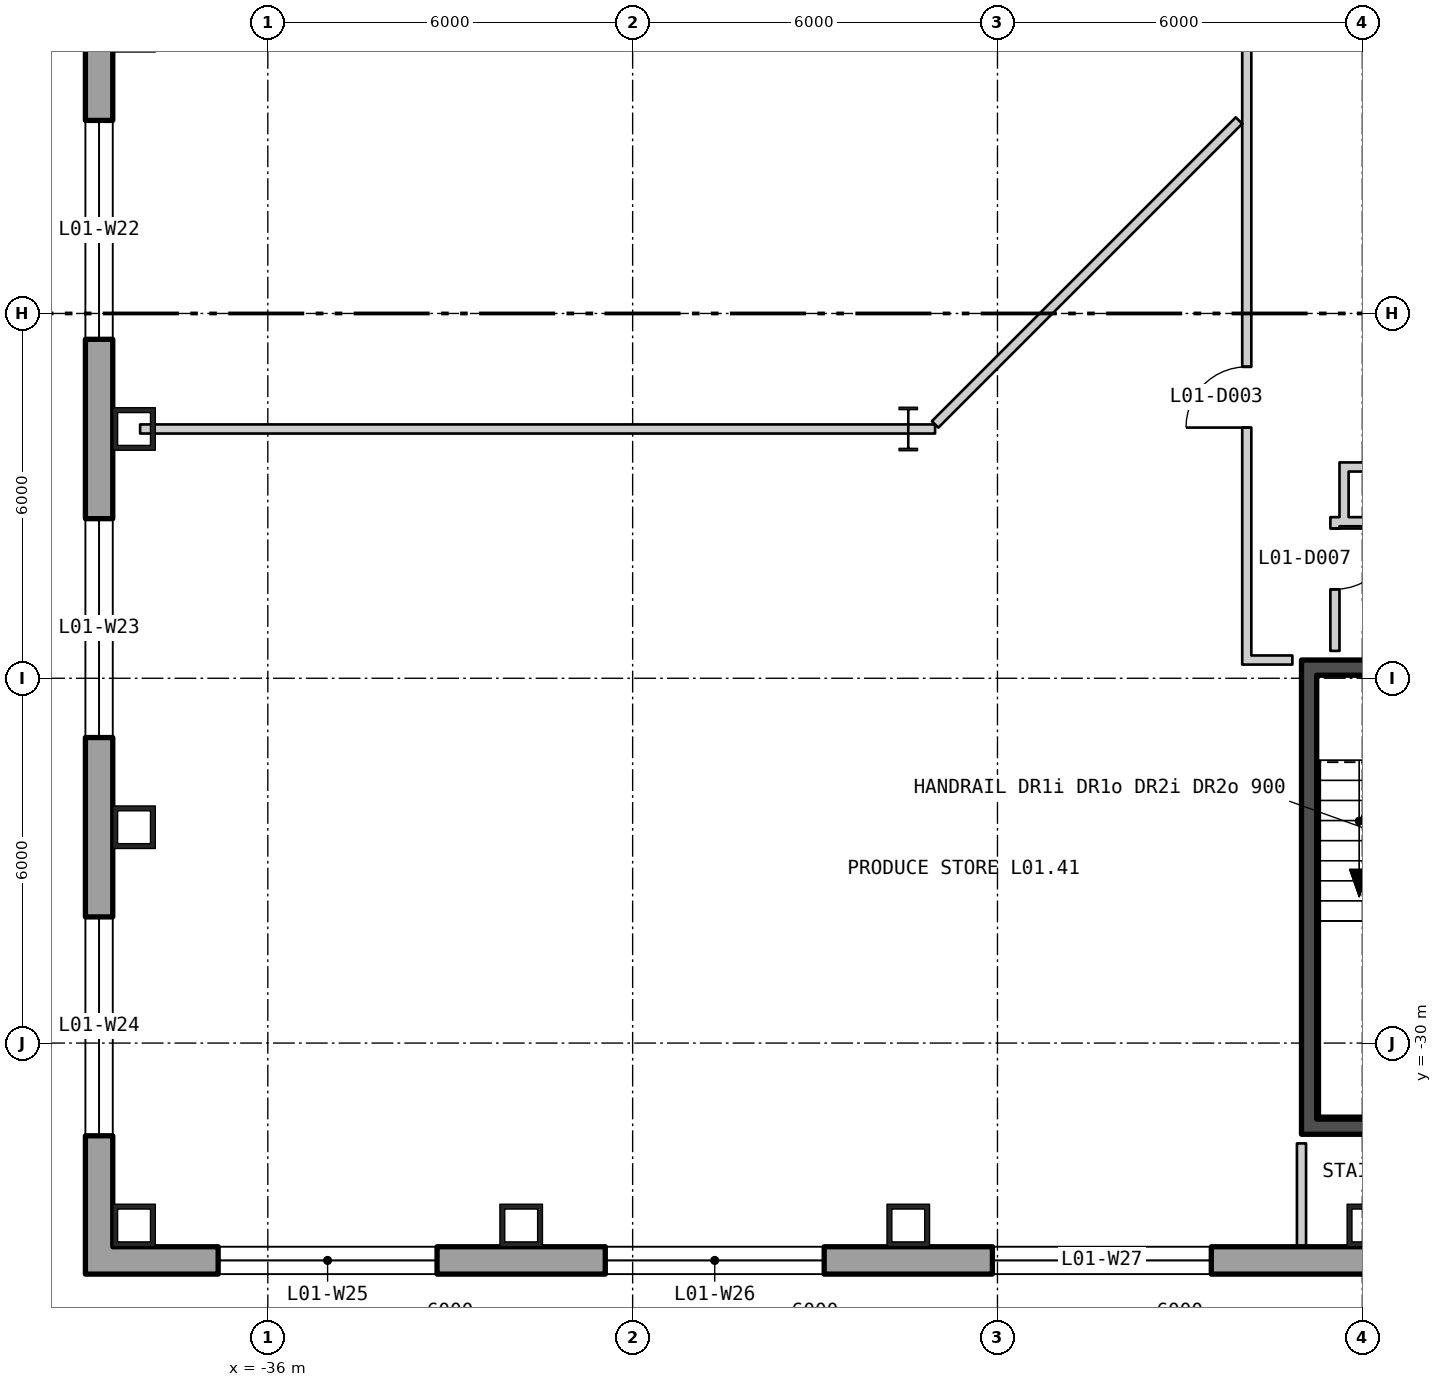
"""IFC4 building model, lengths in metres.
Left out: names, types, materials, properties, quantities, classifications, styles, units other than length and angle.
Written with IfcOpenShell. Run it as: python <this file> out.ifc"""

import sys

from ifc_helpers import new_model, si_unit, direction, frame, frame_2d, origin, origin_2d, place, context, subcontext, project, spatial, polyline, rectangle, hollow_rectangle, i_section, outline, extrude, element, fill, save


model = new_model("IFC4")
c1 = context("Model", 3, precision=1e-05, world=origin(), true_north=direction((0.0, 1.0)))
c2 = subcontext(c1, "Body", "Model", "MODEL_VIEW")
j1 = project(units=[si_unit("LENGTHUNIT", "METRE"), si_unit("PLANEANGLEUNIT", "RADIAN")], contexts=[c1])
p1 = place(None, origin())
s1 = spatial("IfcSite", under=j1, at=p1, CompositionType="ELEMENT")
p2 = place(p1, origin())
s2 = spatial("IfcBuilding", under=s1, at=p2, CompositionType="ELEMENT")
p3 = place(p2, frame((0.0, 0.0, 8.4)))
s3 = spatial("IfcBuildingStorey", under=s2, at=p3, CompositionType="ELEMENT", Elevation=8.4)
for number, where, z_axis, x_axis in (
    (1, (-38.2, -19.9, 0.0), (0.0, 0.0, 1.0), (0.0, -1.0, 0.0)),
    (2, (-38.2, -26.45, 0.0), (0.0, 0.0, 1.0), (0.0, -1.0, 0.0)),
    (3, (-38.2, -33.0, 0.0), (0.0, 0.0, 1.0), (1.0, 0.0, 0.0)),
    (4, (-31.833, -33.0, 0.0), (0.0, 0.0, 1.0), (1.0, 0.0, 0.0)),
    (5, (-25.467, -33.0, 0.0), (0.0, 0.0, 1.0), (1.0, 0.0, 0.0)),
    (6, (-17.9, -33.0, 0.0), (0.0, 0.0, 1.0), (1.0, 0.0, 0.0)),
):
    element("IfcColumn", number, at=place(p3, frame(where, z_axis=z_axis, x_axis=x_axis)), inside=s3, PredefinedType="COLUMN", context=c2, shape_type="SweptSolid", body=[
        extrude(hollow_rectangle(XDim=0.7, YDim=0.7, WallThickness=0.08, at=origin_2d()), origin(), (0.0, 0.0, 1.0), 5.1),
    ])
p4 = place(p3, frame((-25.467, -19.9, 0.0), z_axis=(0.0, 0.0, 1.0), x_axis=(1.0, 0.0, 0.0)))
e7 = element("IfcColumn", 7, at=p4, inside=s3, PredefinedType="COLUMN", context=c2, shape_type="SweptSolid", body=[
    extrude(i_section(OverallWidth=0.304, OverallDepth=0.716, WebThickness=0.021, FlangeThickness=0.04, at=origin_2d()), origin(), (0.0, 0.0, 1.0), 5.1),
])
p5 = place(p3, frame((-38.775, 19.975, -0.4), z_axis=(0.0, 0.0, 1.0), x_axis=(0.0, -1.0, 0.0)))
e8 = element("IfcWall", 8, at=p5, inside=s3, PredefinedType="SOLIDWALL", context=c2, shape_type="SweptSolid", body=[
    extrude(outline(polyline([(-0.225, -0.225), (53.775, -0.225), (53.325, 0.225), (0.225, 0.225), (-0.225, -0.225)])), origin(), (0.0, 0.0, 1.0), 5.1),
])
p6 = place(p5, frame((2.05, 0.0, 1.3)))
e9 = element("IfcOpeningElement", 9, at=p6, cuts=e8, PredefinedType="OPENING", context=c2, shape_type="SweptSolid", body=[
    extrude(rectangle(XDim=3.6, YDim=3.2, at=frame_2d((1.8, 1.6))), frame((0.0, 0.235, 0.0), z_axis=(0.0, -1.0, 0.0), x_axis=(1.0, 0.0, 0.0)), (0.0, 0.0, 1.0), 0.47),
])
p7 = place(p5, frame((8.6, 0.0, 1.3)))
e10 = element("IfcOpeningElement", 10, at=p7, cuts=e8, PredefinedType="OPENING", context=c2, shape_type="SweptSolid", body=[
    extrude(rectangle(XDim=3.6, YDim=3.2, at=frame_2d((1.8, 1.6))), frame((0.0, 0.235, 0.0), z_axis=(0.0, -1.0, 0.0), x_axis=(1.0, 0.0, 0.0)), (0.0, 0.0, 1.0), 0.47),
])
p8 = place(p5, frame((15.15, 0.0, 1.3)))
e11 = element("IfcOpeningElement", 11, at=p8, cuts=e8, PredefinedType="OPENING", context=c2, shape_type="SweptSolid", body=[
    extrude(rectangle(XDim=3.6, YDim=3.2, at=frame_2d((1.8, 1.6))), frame((0.0, 0.235, 0.0), z_axis=(0.0, -1.0, 0.0), x_axis=(1.0, 0.0, 0.0)), (0.0, 0.0, 1.0), 0.47),
])
p9 = place(p5, frame((21.7, 0.0, 1.3)))
e12 = element("IfcOpeningElement", 12, at=p9, cuts=e8, PredefinedType="OPENING", context=c2, shape_type="SweptSolid", body=[
    extrude(rectangle(XDim=3.6, YDim=3.2, at=frame_2d((1.8, 1.6))), frame((0.0, 0.235, 0.0), z_axis=(0.0, -1.0, 0.0), x_axis=(1.0, 0.0, 0.0)), (0.0, 0.0, 1.0), 0.47),
])
p10 = place(p5, frame((28.25, 0.0, 1.3)))
e13 = element("IfcOpeningElement", 13, at=p10, cuts=e8, PredefinedType="OPENING", context=c2, shape_type="SweptSolid", body=[
    extrude(rectangle(XDim=3.6, YDim=3.2, at=frame_2d((1.8, 1.6))), frame((0.0, 0.235, 0.0), z_axis=(0.0, -1.0, 0.0), x_axis=(1.0, 0.0, 0.0)), (0.0, 0.0, 1.0), 0.47),
])
p11 = place(p5, frame((34.8, 0.0, 1.3)))
e14 = element("IfcOpeningElement", 14, at=p11, cuts=e8, PredefinedType="OPENING", context=c2, shape_type="SweptSolid", body=[
    extrude(rectangle(XDim=3.6, YDim=3.2, at=frame_2d((1.8, 1.6))), frame((0.0, 0.235, 0.0), z_axis=(0.0, -1.0, 0.0), x_axis=(1.0, 0.0, 0.0)), (0.0, 0.0, 1.0), 0.47),
])
p12 = place(p5, frame((41.35, 0.0, 1.3)))
e15 = element("IfcOpeningElement", 15, at=p12, cuts=e8, PredefinedType="OPENING", context=c2, shape_type="SweptSolid", body=[
    extrude(rectangle(XDim=3.6, YDim=3.2, at=frame_2d((1.8, 1.6))), frame((0.0, 0.235, 0.0), z_axis=(0.0, -1.0, 0.0), x_axis=(1.0, 0.0, 0.0)), (0.0, 0.0, 1.0), 0.47),
])
p13 = place(p5, frame((47.9, 0.0, 1.3)))
e16 = element("IfcOpeningElement", 16, at=p13, cuts=e8, PredefinedType="OPENING", context=c2, shape_type="SweptSolid", body=[
    extrude(rectangle(XDim=3.6, YDim=3.2, at=frame_2d((1.8, 1.6))), frame((0.0, 0.235, 0.0), z_axis=(0.0, -1.0, 0.0), x_axis=(1.0, 0.0, 0.0)), (0.0, 0.0, 1.0), 0.47),
])
p14 = place(p3, frame((-38.775, -33.575, -0.4), z_axis=(0.0, 0.0, 1.0), x_axis=(1.0, 0.0, 0.0)))
e17 = element("IfcWall", 17, at=p14, inside=s3, PredefinedType="SOLIDWALL", context=c2, shape_type="SweptSolid", body=[
    extrude(outline(polyline([(-0.225, -0.225), (77.775, -0.225), (77.325, 0.225), (0.225, 0.225), (-0.225, -0.225)])), origin(), (0.0, 0.0, 1.0), 5.1),
])
p15 = place(p14, frame((1.958, 0.0, 1.3)))
e18 = element("IfcOpeningElement", 18, at=p15, cuts=e17, PredefinedType="OPENING", context=c2, shape_type="SweptSolid", body=[
    extrude(rectangle(XDim=3.6, YDim=3.2, at=frame_2d((1.8, 1.6))), frame((0.0, 0.235, 0.0), z_axis=(0.0, -1.0, 0.0), x_axis=(1.0, 0.0, 0.0)), (0.0, 0.0, 1.0), 0.47),
])
p16 = place(p14, frame((8.325, 0.0, 1.3)))
e19 = element("IfcOpeningElement", 19, at=p16, cuts=e17, PredefinedType="OPENING", context=c2, shape_type="SweptSolid", body=[
    extrude(rectangle(XDim=3.6, YDim=3.2, at=frame_2d((1.8, 1.6))), frame((0.0, 0.235, 0.0), z_axis=(0.0, -1.0, 0.0), x_axis=(1.0, 0.0, 0.0)), (0.0, 0.0, 1.0), 0.47),
])
p17 = place(p14, frame((14.692, 0.0, 1.3)))
e20 = element("IfcOpeningElement", 20, at=p17, cuts=e17, PredefinedType="OPENING", context=c2, shape_type="SweptSolid", body=[
    extrude(rectangle(XDim=3.6, YDim=3.2, at=frame_2d((1.8, 1.6))), frame((0.0, 0.235, 0.0), z_axis=(0.0, -1.0, 0.0), x_axis=(1.0, 0.0, 0.0)), (0.0, 0.0, 1.0), 0.47),
])
p18 = place(p14, frame((21.325, 0.0, 1.3)))
e21 = element("IfcOpeningElement", 21, at=p18, cuts=e17, PredefinedType="OPENING", context=c2, shape_type="SweptSolid", body=[
    extrude(rectangle(XDim=3.6, YDim=3.2, at=frame_2d((1.8, 1.6))), frame((0.0, 0.235, 0.0), z_axis=(0.0, -1.0, 0.0), x_axis=(1.0, 0.0, 0.0)), (0.0, 0.0, 1.0), 0.47),
])
p19 = place(p14, frame((27.425, 0.0, 1.3)))
e22 = element("IfcOpeningElement", 22, at=p19, cuts=e17, PredefinedType="OPENING", context=c2, shape_type="SweptSolid", body=[
    extrude(rectangle(XDim=3.6, YDim=3.2, at=frame_2d((1.8, 1.6))), frame((0.0, 0.235, 0.0), z_axis=(0.0, -1.0, 0.0), x_axis=(1.0, 0.0, 0.0)), (0.0, 0.0, 1.0), 0.47),
])
p20 = place(p14, frame((33.792, 0.0, 1.3)))
e23 = element("IfcOpeningElement", 23, at=p20, cuts=e17, PredefinedType="OPENING", context=c2, shape_type="SweptSolid", body=[
    extrude(rectangle(XDim=3.6, YDim=3.2, at=frame_2d((1.8, 1.6))), frame((0.0, 0.235, 0.0), z_axis=(0.0, -1.0, 0.0), x_axis=(1.0, 0.0, 0.0)), (0.0, 0.0, 1.0), 0.47),
])
p21 = place(p14, frame((40.158, 0.0, 1.3)))
e24 = element("IfcOpeningElement", 24, at=p21, cuts=e17, PredefinedType="OPENING", context=c2, shape_type="SweptSolid", body=[
    extrude(rectangle(XDim=3.6, YDim=3.2, at=frame_2d((1.8, 1.6))), frame((0.0, 0.235, 0.0), z_axis=(0.0, -1.0, 0.0), x_axis=(1.0, 0.0, 0.0)), (0.0, 0.0, 1.0), 0.47),
])
p22 = place(p14, frame((46.525, 0.0, 1.3)))
e25 = element("IfcOpeningElement", 25, at=p22, cuts=e17, PredefinedType="OPENING", context=c2, shape_type="SweptSolid", body=[
    extrude(rectangle(XDim=3.6, YDim=3.2, at=frame_2d((1.8, 1.6))), frame((0.0, 0.235, 0.0), z_axis=(0.0, -1.0, 0.0), x_axis=(1.0, 0.0, 0.0)), (0.0, 0.0, 1.0), 0.47),
])
p23 = place(p14, frame((52.625, 0.0, 1.3)))
e26 = element("IfcOpeningElement", 26, at=p23, cuts=e17, PredefinedType="OPENING", context=c2, shape_type="SweptSolid", body=[
    extrude(rectangle(XDim=3.6, YDim=3.2, at=frame_2d((1.8, 1.6))), frame((0.0, 0.235, 0.0), z_axis=(0.0, -1.0, 0.0), x_axis=(1.0, 0.0, 0.0)), (0.0, 0.0, 1.0), 0.47),
])
p24 = place(p14, frame((59.258, 0.0, 1.3)))
e27 = element("IfcOpeningElement", 27, at=p24, cuts=e17, PredefinedType="OPENING", context=c2, shape_type="SweptSolid", body=[
    extrude(rectangle(XDim=3.6, YDim=3.2, at=frame_2d((1.8, 1.6))), frame((0.0, 0.235, 0.0), z_axis=(0.0, -1.0, 0.0), x_axis=(1.0, 0.0, 0.0)), (0.0, 0.0, 1.0), 0.47),
])
p25 = place(p14, frame((65.625, 0.0, 1.3)))
e28 = element("IfcOpeningElement", 28, at=p25, cuts=e17, PredefinedType="OPENING", context=c2, shape_type="SweptSolid", body=[
    extrude(rectangle(XDim=3.6, YDim=3.2, at=frame_2d((1.8, 1.6))), frame((0.0, 0.235, 0.0), z_axis=(0.0, -1.0, 0.0), x_axis=(1.0, 0.0, 0.0)), (0.0, 0.0, 1.0), 0.47),
])
p26 = place(p14, frame((71.992, 0.0, 1.3)))
e29 = element("IfcOpeningElement", 29, at=p26, cuts=e17, PredefinedType="OPENING", context=c2, shape_type="SweptSolid", body=[
    extrude(rectangle(XDim=3.6, YDim=3.2, at=frame_2d((1.8, 1.6))), frame((0.0, 0.235, 0.0), z_axis=(0.0, -1.0, 0.0), x_axis=(1.0, 0.0, 0.0)), (0.0, 0.0, 1.0), 0.47),
])
p27 = place(p3, frame((-18.875, -31.25, 0.0), z_axis=(0.0, 0.0, 1.0), x_axis=(0.0, 1.0, 0.0)))
e30 = element("IfcWall", 30, at=p27, inside=s3, PredefinedType="SHEAR", context=c2, shape_type="SweptSolid", body=[
    extrude(rectangle(XDim=7.3, YDim=0.25, at=frame_2d((3.65, 0.0))), origin(), (0.0, 0.0, 1.0), 4.88),
])
p28 = place(p3, frame((-19.0, -31.375, 0.0), z_axis=(0.0, 0.0, 1.0), x_axis=(1.0, 0.0, 0.0)))
e31 = element("IfcWall", 31, at=p28, inside=s3, PredefinedType="SHEAR", context=c2, shape_type="SweptSolid", body=[
    extrude(rectangle(XDim=3.5, YDim=0.25, at=frame_2d((1.75, 0.0))), origin(), (0.0, 0.0, 1.0), 4.88),
])
p29 = place(p3, frame((-19.0, -23.825, 0.0), z_axis=(0.0, 0.0, 1.0), x_axis=(1.0, 0.0, 0.0)))
e32 = element("IfcWall", 32, at=p29, inside=s3, PredefinedType="SHEAR", context=c2, shape_type="SweptSolid", body=[
    extrude(rectangle(XDim=3.5, YDim=0.25, at=frame_2d((1.75, 0.0))), origin(), (0.0, 0.0, 1.0), 4.88),
])
p30 = place(p29, frame((1.15, 0.0, 0.0)))
e33 = element("IfcOpeningElement", 33, at=p30, cuts=e32, PredefinedType="OPENING", context=c2, shape_type="SweptSolid", body=[
    extrude(rectangle(XDim=1.2, YDim=2.1, at=frame_2d((0.6, 1.05))), frame((0.0, 0.135, 0.0), z_axis=(0.0, -1.0, 0.0), x_axis=(1.0, 0.0, 0.0)), (0.0, 0.0, 1.0), 0.27),
])
p31 = place(p3, frame((-38.1, -19.9, 0.0), z_axis=(0.0, 0.0, 1.0), x_axis=(1.0, 0.0, 0.0)))
e34 = element("IfcWall", 34, at=p31, inside=s3, PredefinedType="PARTITIONING", context=c2, shape_type="SweptSolid", body=[
    extrude(rectangle(XDim=12.633, YDim=0.15, at=frame_2d((6.316, 0.0))), origin(), (0.0, 0.0, 1.0), 4.09),
])
p32 = place(p3, frame((-25.467, -19.9, 0.0), z_axis=(0.0, 0.0, 1.0), x_axis=(1.0, 0.0, 0.0)))
e35 = element("IfcWall", 35, at=p32, inside=s3, PredefinedType="PARTITIONING", context=c2, shape_type="SweptSolid", body=[
    extrude(rectangle(XDim=0.441, YDim=0.15, at=frame_2d((0.221, 0.0))), origin(), (0.0, 0.0, 1.0), 4.88),
])
p33 = place(p3, frame((-25.026, -19.825, 0.0), z_axis=(0.0, 0.0, 1.0), x_axis=(0.707106781187, 0.707106781187, 0.0)))
e36 = element("IfcWall", 36, at=p33, inside=s3, PredefinedType="PARTITIONING", context=c2, shape_type="SweptSolid", body=[
    extrude(rectangle(XDim=7.068, YDim=0.15, at=frame_2d((3.534, 0.0))), origin(), (0.0, 0.0, 1.0), 4.88),
])
p34 = place(p3, frame((-19.9, -23.775, 0.0), z_axis=(0.0, 0.0, 1.0), x_axis=(0.0, 1.0, 0.0)))
e37 = element("IfcWall", 37, at=p34, inside=s3, PredefinedType="PARTITIONING", context=c2, shape_type="SweptSolid", body=[
    extrude(rectangle(XDim=21.25, YDim=0.15, at=frame_2d((10.625, 0.0))), origin(), (0.0, 0.0, 1.0), 4.88),
])
p35 = place(p34, frame((3.898, 0.0, 0.0)))
e38 = element("IfcOpeningElement", 38, at=p35, cuts=e37, PredefinedType="OPENING", context=c2, shape_type="SweptSolid", body=[
    extrude(rectangle(XDim=1.0, YDim=2.1, at=frame_2d((0.5, 1.05))), frame((0.0, 0.085, 0.0), z_axis=(0.0, -1.0, 0.0), x_axis=(1.0, 0.0, 0.0)), (0.0, 0.0, 1.0), 0.17),
])
p36 = place(p34, frame((12.399, 0.0, 0.0)))
e39 = element("IfcOpeningElement", 39, at=p36, cuts=e37, PredefinedType="OPENING", context=c2, shape_type="SweptSolid", body=[
    extrude(rectangle(XDim=1.0, YDim=2.1, at=frame_2d((0.5, 1.05))), frame((0.0, 0.085, 0.0), z_axis=(0.0, -1.0, 0.0), x_axis=(1.0, 0.0, 0.0)), (0.0, 0.0, 1.0), 0.17),
])
p37 = place(p3, frame((-19.825, -23.7, 0.0), z_axis=(0.0, 0.0, 1.0), x_axis=(1.0, 0.0, 0.0)))
e40 = element("IfcWall", 40, at=p37, inside=s3, PredefinedType="PARTITIONING", context=c2, shape_type="SweptSolid", body=[
    extrude(rectangle(XDim=0.675, YDim=0.15, at=frame_2d((0.338, 0.0))), origin(), (0.0, 0.0, 1.0), 4.88),
])
p38 = place(p3, frame((-19.0, -33.348, 0.0), z_axis=(0.0, 0.0, 1.0), x_axis=(0.0, 1.0, 0.0)))
e41 = element("IfcWall", 41, at=p38, inside=s3, PredefinedType="PARTITIONING", context=c2, shape_type="SweptSolid", body=[
    extrude(rectangle(XDim=0.448, YDim=0.15, at=frame_2d((0.224, 0.0))), origin(), (0.0, 0.0, 1.0), 4.88),
])
p39 = place(p3, frame((-19.0, -32.9, 0.0), z_axis=(0.0, 0.0, 1.0), x_axis=(0.0, 1.0, 0.0)))
e42 = element("IfcWall", 42, at=p39, inside=s3, PredefinedType="PARTITIONING", context=c2, shape_type="SweptSolid", body=[
    extrude(rectangle(XDim=1.25, YDim=0.15, at=frame_2d((0.625, 0.0))), origin(), (0.0, 0.0, 1.0), 4.19),
])
p40 = place(p3, frame((-18.45, -23.55, 0.0), z_axis=(0.0, 0.0, 1.0), x_axis=(0.0, 1.0, 0.0)))
e43 = element("IfcWall", 43, at=p40, inside=s3, PredefinedType="PARTITIONING", context=c2, shape_type="SweptSolid", body=[
    extrude(rectangle(XDim=2.2, YDim=0.15, at=frame_2d((1.1, 0.0))), origin(), (0.0, 0.0, 1.0), 4.88),
])
p41 = place(p40, frame((1.013, 0.0, 0.0)))
e44 = element("IfcOpeningElement", 44, at=p41, cuts=e43, PredefinedType="OPENING", context=c2, shape_type="SweptSolid", body=[
    extrude(rectangle(XDim=1.0, YDim=2.1, at=frame_2d((0.5, 1.05))), frame((0.0, 0.085, 0.0), z_axis=(0.0, -1.0, 0.0), x_axis=(1.0, 0.0, 0.0)), (0.0, 0.0, 1.0), 0.17),
])
p42 = place(p3, frame((-18.3, -21.5, 0.0), z_axis=(0.0, 0.0, 1.0), x_axis=(0.0, 1.0, 0.0)))
e45 = element("IfcWall", 45, at=p42, inside=s3, PredefinedType="PARTITIONING", context=c2, shape_type="SweptSolid", body=[
    extrude(rectangle(XDim=1.05, YDim=0.15, at=frame_2d((0.525, 0.0))), origin(), (0.0, 0.0, 1.0), 4.88),
])
for number, where, z_axis, x_axis in (
    (46, (-18.225, -21.425, 0.0), (0.0, 0.0, 1.0), (1.0, 0.0, 0.0)),
    (47, (-18.225, -20.525, 0.0), (0.0, 0.0, 1.0), (1.0, 0.0, 0.0)),
):
    element("IfcWall", number, at=place(p3, frame(where, z_axis=z_axis, x_axis=x_axis)), inside=s3, PredefinedType="PARTITIONING", context=c2, shape_type="SweptSolid", body=[
        extrude(rectangle(XDim=0.65, YDim=0.15, at=frame_2d((0.325, 0.0))), origin(), (0.0, 0.0, 1.0), 4.88),
    ])
p43 = place(p11, origin())
e48 = element("IfcWindow", 48, at=p43, inside=s3, PartitioningType="SINGLE_PANEL", PredefinedType="WINDOW", context=c2, shape_type="SweptSolid", body=[
    extrude(rectangle(XDim=3.6, YDim=3.2, at=frame_2d((1.8, 1.6))), frame((0.0, 0.105, 0.0), z_axis=(0.0, -1.0, 0.0), x_axis=(1.0, 0.0, 0.0)), (0.0, 0.0, 1.0), 0.06),
])
fill(e14, e48)
p44 = place(p12, origin())
e49 = element("IfcWindow", 49, at=p44, inside=s3, PartitioningType="SINGLE_PANEL", PredefinedType="WINDOW", context=c2, shape_type="SweptSolid", body=[
    extrude(rectangle(XDim=3.6, YDim=3.2, at=frame_2d((1.8, 1.6))), frame((0.0, 0.105, 0.0), z_axis=(0.0, -1.0, 0.0), x_axis=(1.0, 0.0, 0.0)), (0.0, 0.0, 1.0), 0.06),
])
fill(e15, e49)
p45 = place(p13, origin())
e50 = element("IfcWindow", 50, at=p45, inside=s3, PartitioningType="SINGLE_PANEL", PredefinedType="WINDOW", context=c2, shape_type="SweptSolid", body=[
    extrude(rectangle(XDim=3.6, YDim=3.2, at=frame_2d((1.8, 1.6))), frame((0.0, 0.105, 0.0), z_axis=(0.0, -1.0, 0.0), x_axis=(1.0, 0.0, 0.0)), (0.0, 0.0, 1.0), 0.06),
])
fill(e16, e50)
p46 = place(p15, origin())
e51 = element("IfcWindow", 51, at=p46, inside=s3, PartitioningType="SINGLE_PANEL", PredefinedType="WINDOW", context=c2, shape_type="SweptSolid", body=[
    extrude(rectangle(XDim=3.6, YDim=3.2, at=frame_2d((1.8, 1.6))), frame((0.0, 0.105, 0.0), z_axis=(0.0, -1.0, 0.0), x_axis=(1.0, 0.0, 0.0)), (0.0, 0.0, 1.0), 0.06),
])
fill(e18, e51)
p47 = place(p16, origin())
e52 = element("IfcWindow", 52, at=p47, inside=s3, PartitioningType="SINGLE_PANEL", PredefinedType="WINDOW", context=c2, shape_type="SweptSolid", body=[
    extrude(rectangle(XDim=3.6, YDim=3.2, at=frame_2d((1.8, 1.6))), frame((0.0, 0.105, 0.0), z_axis=(0.0, -1.0, 0.0), x_axis=(1.0, 0.0, 0.0)), (0.0, 0.0, 1.0), 0.06),
])
fill(e19, e52)
p48 = place(p17, origin())
e53 = element("IfcWindow", 53, at=p48, inside=s3, PartitioningType="SINGLE_PANEL", PredefinedType="WINDOW", context=c2, shape_type="SweptSolid", body=[
    extrude(rectangle(XDim=3.6, YDim=3.2, at=frame_2d((1.8, 1.6))), frame((0.0, 0.105, 0.0), z_axis=(0.0, -1.0, 0.0), x_axis=(1.0, 0.0, 0.0)), (0.0, 0.0, 1.0), 0.06),
])
fill(e20, e53)
p49 = place(p35, origin())
e54 = element("IfcDoor", 54, at=p49, inside=s3, OperationType="SINGLE_SWING_RIGHT", PredefinedType="DOOR", context=c2, shape_type="SweptSolid", body=[
    extrude(rectangle(XDim=1.0, YDim=2.1, at=frame_2d((0.5, 1.05))), frame((0.0, 0.025, 0.0), z_axis=(0.0, -1.0, 0.0), x_axis=(1.0, 0.0, 0.0)), (0.0, 0.0, 1.0), 0.05),
])
fill(e38, e54)
p50 = place(p41, origin())
e55 = element("IfcDoor", 55, at=p50, inside=s3, OperationType="SINGLE_SWING_RIGHT", PredefinedType="DOOR", context=c2, shape_type="SweptSolid", body=[
    extrude(rectangle(XDim=1.0, YDim=2.1, at=frame_2d((0.5, 1.05))), frame((0.0, 0.025, 0.0), z_axis=(0.0, -1.0, 0.0), x_axis=(1.0, 0.0, 0.0)), (0.0, 0.0, 1.0), 0.05),
])
fill(e44, e55)
save(model, sys.argv[1])
